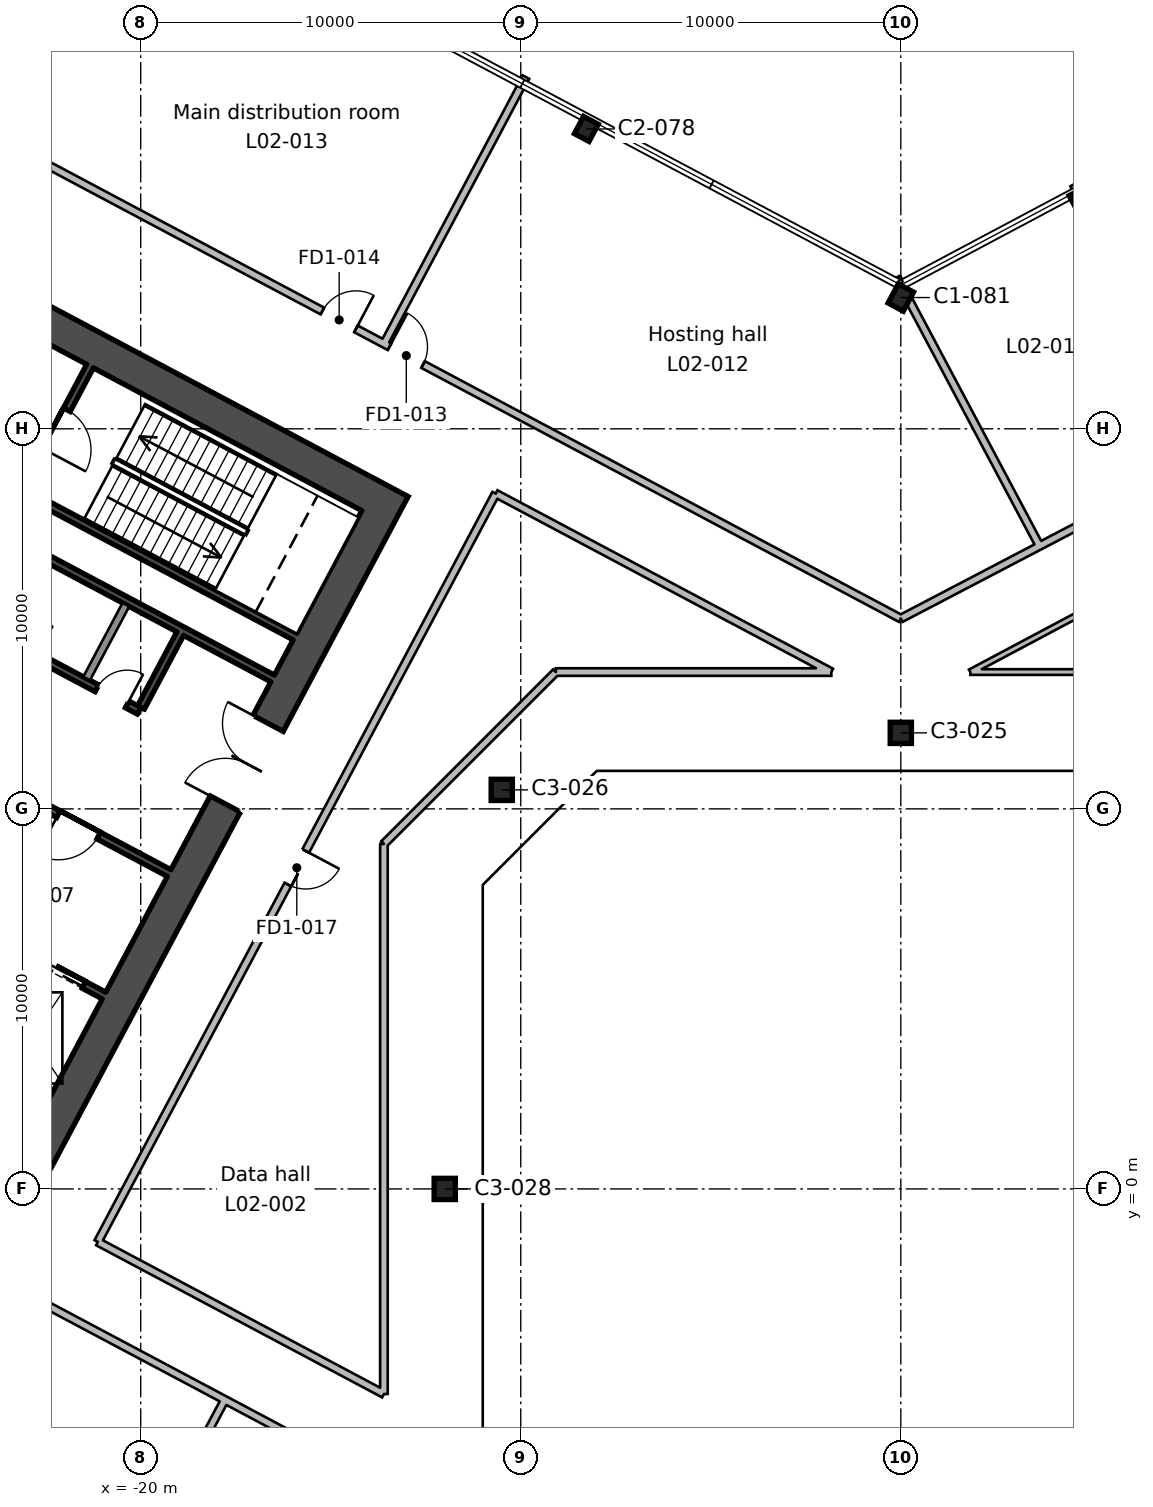
"""IFC4 building model, lengths in metres.
Left out: names, types, materials, properties, quantities, classifications, styles, units other than length and angle.
Written with IfcOpenShell. Run it as: python <this file> out.ifc"""

import sys

from ifc_helpers import new_model, si_unit, direction, frame, frame_2d, origin, origin_2d, place, context, subcontext, project, spatial, rectangle, hollow_rectangle, i_section, extrude, element, fill, save


model = new_model("IFC4")
c1 = context("Model", 3, precision=1e-05, world=origin(), true_north=direction((0.0, 1.0)))
c2 = subcontext(c1, "Body", "Model", "MODEL_VIEW")
j1 = project(units=[si_unit("LENGTHUNIT", "METRE"), si_unit("PLANEANGLEUNIT", "RADIAN")], contexts=[c1])
p1 = place(None, origin())
s1 = spatial("IfcSite", under=j1, at=p1, CompositionType="ELEMENT")
p2 = place(p1, origin())
s2 = spatial("IfcBuilding", under=s1, at=p2, CompositionType="ELEMENT")
p3 = place(p2, frame((0.0, 0.0, 12.2)))
s3 = spatial("IfcBuildingStorey", under=s2, at=p3, CompositionType="ELEMENT", Elevation=12.2)
for number, where, z_axis, x_axis in (
    (1, (-12.0, 0.0, 0.0), (0.0, 0.0, 1.0), (1.0, 0.0, 0.0)),
    (2, (-10.5, 10.5, 0.0), (0.0, 0.0, 1.0), (1.0, 0.0, 0.0)),
    (3, (0.0, 12.0, 0.0), (0.0, 0.0, 1.0), (1.0, 0.0, 0.0)),
):
    element("IfcColumn", number, at=place(p3, frame(where, z_axis=z_axis, x_axis=x_axis)), inside=s3, PredefinedType="COLUMN", context=c2, shape_type="SweptSolid", body=[
        extrude(hollow_rectangle(XDim=0.559, YDim=0.559, WallThickness=0.024, InnerFilletRadius=0.012, OuterFilletRadius=0.035, at=origin_2d()), origin(), (0.0, 0.0, 1.0), 5.4),
    ])
p4 = place(p3, frame((0.0, 23.454, 0.0), z_axis=(0.0, 0.0, 1.0), x_axis=(-0.882947592859, 0.469471562786, 0.0)))
e4 = element("IfcColumn", 4, at=p4, inside=s3, PredefinedType="COLUMN", context=c2, shape_type="SweptSolid", body=[
    extrude(i_section(OverallWidth=0.455, OverallDepth=0.569, WebThickness=0.078, FlangeThickness=0.125, FilletRadius=0.015, at=origin_2d()), origin(), (0.0, 0.0, 1.0), 5.4),
])
for number, where, z_axis, x_axis in (
    (5, (4.744, 26.012, 0.0), (0.0, 0.0, 1.0), (-0.883, -0.469, 0.0)),
    (6, (-8.275, 27.89, 0.0), (0.0, 0.0, 1.0), (-0.883, 0.469, 0.0)),
):
    element("IfcColumn", number, at=place(p3, frame(where, z_axis=z_axis, x_axis=x_axis)), inside=s3, PredefinedType="COLUMN", context=c2, shape_type="SweptSolid", body=[
        extrude(i_section(OverallWidth=0.437, OverallDepth=0.513, WebThickness=0.061, FlangeThickness=0.097, FilletRadius=0.015, at=origin_2d()), origin(), (0.0, 0.0, 1.0), 5.4),
    ])
p5 = place(p3, frame((-13.362, 18.43, 0.0), z_axis=(0.0, 0.0, 1.0), x_axis=(-0.46947084998, -0.882947971864, 0.0)))
e7 = element("IfcWall", 7, at=p5, inside=s3, PredefinedType="SHEAR", context=c2, shape_type="SweptSolid", body=[
    extrude(rectangle(XDim=20.0, YDim=0.9, at=frame_2d((10.0, 0.0))), origin(), (0.0, 0.0, 1.0), 5.4),
])
p6 = place(p5, frame((7.0, 0.0, 0.0)))
e8 = element("IfcOpeningElement", 8, at=p6, cuts=e7, PredefinedType="OPENING", context=c2, shape_type="SweptSolid", body=[
    extrude(rectangle(XDim=2.4, YDim=2.4, at=frame_2d((1.2, 1.2))), frame((0.0, 0.46, 0.0), z_axis=(0.0, -1.0, 0.0), x_axis=(1.0, 0.0, 0.0)), (0.0, 0.0, 1.0), 0.92),
])
p7 = place(p3, frame((-13.97, 18.244, 0.0), z_axis=(0.0, 0.0, 1.0), x_axis=(-0.88294509198, 0.469476266226, 0.0)))
e9 = element("IfcWall", 9, at=p7, inside=s3, PredefinedType="SHEAR", context=c2, shape_type="SweptSolid", body=[
    extrude(rectangle(XDim=20.2, YDim=0.9, at=frame_2d((10.1, 0.0))), origin(), (0.0, 0.0, 1.0), 5.4),
])
p8 = place(p3, frame((-18.96, 14.611, 0.0), z_axis=(0.0, 0.0, 1.0), x_axis=(-0.4694473164, -0.882960484464, 0.0)))
e10 = element("IfcWall", 10, at=p8, inside=s3, PredefinedType="SHEAR", context=c2, shape_type="SweptSolid", body=[
    extrude(rectangle(XDim=2.2, YDim=0.2, at=frame_2d((1.1, 0.0))), origin(), (0.0, 0.0, 1.0), 5.4),
])
p9 = place(p3, frame((-20.39, 15.372, 0.0), z_axis=(0.0, 0.0, 1.0), x_axis=(-0.4694473164, -0.882960484464, 0.0)))
e11 = element("IfcWall", 11, at=p9, inside=s3, PredefinedType="SOLIDWALL", context=c2, shape_type="SweptSolid", body=[
    extrude(rectangle(XDim=2.2, YDim=0.2, at=frame_2d((1.1, 0.0))), origin(), (0.0, 0.0, 1.0), 5.4),
])
p10 = place(p3, frame((-21.333, 21.649, 0.0), z_axis=(0.0, 0.0, 1.0), x_axis=(-0.469494272526, -0.882935517501, 0.0)))
e12 = element("IfcWall", 12, at=p10, inside=s3, PredefinedType="SHEAR", context=c2, shape_type="SweptSolid", body=[
    extrude(rectangle(XDim=7.3, YDim=0.2, at=frame_2d((3.65, 0.0))), origin(), (0.0, 0.0, 1.0), 5.4),
])
p11 = place(p10, frame((1.3, 0.0, 0.0)))
e13 = element("IfcOpeningElement", 13, at=p11, cuts=e12, PredefinedType="OPENING", context=c2, shape_type="SweptSolid", body=[
    extrude(rectangle(XDim=1.2, YDim=2.1, at=frame_2d((0.6, 1.05))), frame((0.0, 0.11, 0.0), z_axis=(0.0, -1.0, 0.0), x_axis=(1.0, 0.0, 0.0)), (0.0, 0.0, 1.0), 0.22),
])
p12 = place(p3, frame((-15.942, 14.536, 0.0), z_axis=(0.0, 0.0, 1.0), x_axis=(-0.882946947542, 0.469472776449, 0.0)))
e14 = element("IfcWall", 14, at=p12, inside=s3, PredefinedType="SHEAR", context=c2, shape_type="SweptSolid", body=[
    extrude(rectangle(XDim=8.0, YDim=0.2, at=frame_2d((4.0, 0.0))), origin(), (0.0, 0.0, 1.0), 5.4),
])
p13 = place(p3, frame((-16.529, 13.432, 0.0), z_axis=(0.0, 0.0, 1.0), x_axis=(-0.88295287151, 0.469461634952, 0.0)))
e15 = element("IfcWall", 15, at=p13, inside=s3, PredefinedType="SHEAR", context=c2, shape_type="SweptSolid", body=[
    extrude(rectangle(XDim=8.0, YDim=0.2, at=frame_2d((4.0, 0.0))), origin(), (0.0, 0.0, 1.0), 5.4),
])
p14 = place(p3, frame((-20.04, 12.581, 0.0), z_axis=(0.0, 0.0, 1.0), x_axis=(-0.882942972946, 0.469480251476, 0.0)))
e16 = element("IfcWall", 16, at=p14, inside=s3, PredefinedType="SHEAR", context=c2, shape_type="SweptSolid", body=[
    extrude(rectangle(XDim=5.4, YDim=0.2, at=frame_2d((2.7, 0.0))), origin(), (0.0, 0.0, 1.0), 5.4),
])
p15 = place(p14, frame((0.36, 0.0, 0.0)))
e17 = element("IfcOpeningElement", 17, at=p15, cuts=e16, PredefinedType="OPENING", context=c2, shape_type="SweptSolid", body=[
    extrude(rectangle(XDim=0.9, YDim=2.1, at=frame_2d((0.45, 1.05))), frame((0.0, 0.11, 0.0), z_axis=(0.0, -1.0, 0.0), x_axis=(1.0, 0.0, 0.0)), (0.0, 0.0, 1.0), 0.22),
])
p16 = place(p14, frame((3.06, 0.0, 0.0)))
e18 = element("IfcOpeningElement", 18, at=p16, cuts=e16, PredefinedType="OPENING", context=c2, shape_type="SweptSolid", body=[
    extrude(rectangle(XDim=0.9, YDim=2.1, at=frame_2d((0.45, 1.05))), frame((0.0, 0.11, 0.0), z_axis=(0.0, -1.0, 0.0), x_axis=(1.0, 0.0, 0.0)), (0.0, 0.0, 1.0), 0.22),
])
p17 = place(p3, frame((-19.252, 8.311, 0.0), z_axis=(0.0, 0.0, 1.0), x_axis=(-0.882955722218, 0.469456273365, 0.0)))
e19 = element("IfcWall", 19, at=p17, inside=s3, PredefinedType="SHEAR", context=c2, shape_type="SweptSolid", body=[
    extrude(rectangle(XDim=10.0, YDim=0.2, at=frame_2d((5.0, 0.0))), origin(), (0.0, 0.0, 1.0), 5.4),
])
p18 = place(p17, frame((2.1, 0.0, 0.0)))
e20 = element("IfcOpeningElement", 20, at=p18, cuts=e19, PredefinedType="OPENING", context=c2, shape_type="SweptSolid", body=[
    extrude(rectangle(XDim=1.2, YDim=2.1, at=frame_2d((0.6, 1.05))), frame((0.0, 0.11, 0.0), z_axis=(0.0, -1.0, 0.0), x_axis=(1.0, 0.0, 0.0)), (0.0, 0.0, 1.0), 0.22),
])
p19 = place(p3, frame((-20.965, 5.088, 0.0), z_axis=(0.0, 0.0, 1.0), x_axis=(-0.882925986334, 0.469512196493, 0.0)))
e21 = element("IfcWall", 21, at=p19, inside=s3, PredefinedType="SHEAR", context=c2, shape_type="SweptSolid", body=[
    extrude(rectangle(XDim=4.5, YDim=0.2, at=frame_2d((2.25, 0.0))), origin(), (0.0, 0.0, 1.0), 5.4),
])
p20 = place(p19, frame((0.6, 0.0, 0.0)))
e22 = element("IfcOpeningElement", 22, at=p20, cuts=e21, PredefinedType="OPENING", context=c2, shape_type="SweptSolid", body=[
    extrude(rectangle(XDim=1.1, YDim=2.1, at=frame_2d((0.55, 1.05))), frame((0.0, 0.11, 0.0), z_axis=(0.0, -1.0, 0.0), x_axis=(1.0, 0.0, 0.0)), (0.0, 0.0, 1.0), 0.22),
])
p21 = place(p3, frame((-13.6, -7.775, 0.0), z_axis=(0.0, 0.0, 1.0), x_axis=(-0.882943264249, 0.469479703626, 0.0)))
e23 = element("IfcWall", 23, at=p21, inside=s3, PredefinedType="PARTITIONING", context=c2, shape_type="SweptSolid", body=[
    extrude(rectangle(XDim=34.636, YDim=0.2, at=frame_2d((17.318, 0.0))), origin(), (0.0, 0.0, 1.0), 4.95),
])
p22 = place(p21, frame((16.85, 0.0, 0.0)))
e24 = element("IfcOpeningElement", 24, at=p22, cuts=e23, PredefinedType="OPENING", context=c2, shape_type="SweptSolid", body=[
    extrude(rectangle(XDim=1.0, YDim=2.1, at=frame_2d((0.5, 1.05))), frame((0.0, 0.11, 0.0), z_axis=(0.0, -1.0, 0.0), x_axis=(1.0, 0.0, 0.0)), (0.0, 0.0, 1.0), 0.22),
])
p23 = place(p21, frame((14.25, 0.0, 0.0)))
e25 = element("IfcOpeningElement", 25, at=p23, cuts=e23, PredefinedType="OPENING", context=c2, shape_type="SweptSolid", body=[
    extrude(rectangle(XDim=1.0, YDim=2.1, at=frame_2d((0.5, 1.05))), frame((0.0, 0.11, 0.0), z_axis=(0.0, -1.0, 0.0), x_axis=(1.0, 0.0, 0.0)), (0.0, 0.0, 1.0), 0.22),
])
p24 = place(p3, frame((-17.787, -5.549, 0.0), z_axis=(0.0, 0.0, 1.0), x_axis=(-0.469551855795, -0.882904895625, 0.0)))
e26 = element("IfcWall", 26, at=p24, inside=s3, PredefinedType="PARTITIONING", context=c2, shape_type="SweptSolid", body=[
    extrude(rectangle(XDim=7.95, YDim=0.2, at=frame_2d((3.975, 0.0))), origin(), (0.0, 0.0, 1.0), 4.95),
])
p25 = place(p3, frame((-29.479, 30.681, 0.0), z_axis=(0.0, 0.0, 1.0), x_axis=(0.882953009593, -0.469461375249, 0.0)))
e27 = element("IfcWall", 27, at=p25, inside=s3, PredefinedType="PARTITIONING", context=c2, shape_type="SweptSolid", body=[
    extrude(rectangle(XDim=33.387, YDim=0.2, at=frame_2d((16.693, 0.0))), origin(), (0.0, 0.0, 1.0), 4.95),
])
p26 = place(p25, frame((18.15, 0.0, 0.0)))
e28 = element("IfcOpeningElement", 28, at=p26, cuts=e27, PredefinedType="OPENING", context=c2, shape_type="SweptSolid", body=[
    extrude(rectangle(XDim=1.0, YDim=2.1, at=frame_2d((0.5, 1.05))), frame((0.0, 0.11, 0.0), z_axis=(0.0, -1.0, 0.0), x_axis=(1.0, 0.0, 0.0)), (0.0, 0.0, 1.0), 0.22),
])
p27 = place(p25, frame((16.15, 0.0, 0.0)))
e29 = element("IfcOpeningElement", 29, at=p27, cuts=e27, PredefinedType="OPENING", context=c2, shape_type="SweptSolid", body=[
    extrude(rectangle(XDim=1.0, YDim=2.1, at=frame_2d((0.5, 1.05))), frame((0.0, 0.11, 0.0), z_axis=(0.0, -1.0, 0.0), x_axis=(1.0, 0.0, 0.0)), (0.0, 0.0, 1.0), 0.22),
])
p28 = place(p3, frame((0.0, 15.007, 0.0), z_axis=(0.0, 0.0, 1.0), x_axis=(0.886151087154, 0.463396429352, 0.0)))
e30 = element("IfcWall", 30, at=p28, inside=s3, PredefinedType="PARTITIONING", context=c2, shape_type="SweptSolid", body=[
    extrude(rectangle(XDim=57.206, YDim=0.2, at=frame_2d((28.603, 0.0))), origin(), (0.0, 0.0, 1.0), 4.95),
])
p29 = place(p28, frame((35.149, 0.0, 0.0)))
e31 = element("IfcOpeningElement", 31, at=p29, cuts=e30, PredefinedType="OPENING", context=c2, shape_type="SweptSolid", body=[
    extrude(rectangle(XDim=1.0, YDim=2.1, at=frame_2d((0.5, 1.05))), frame((0.0, 0.11, 0.0), z_axis=(0.0, -1.0, 0.0), x_axis=(1.0, 0.0, 0.0)), (0.0, 0.0, 1.0), 0.22),
])
p30 = place(p28, frame((28.15, 0.0, 0.0)))
e32 = element("IfcOpeningElement", 32, at=p30, cuts=e30, PredefinedType="OPENING", context=c2, shape_type="SweptSolid", body=[
    extrude(rectangle(XDim=1.0, YDim=2.1, at=frame_2d((0.5, 1.05))), frame((0.0, 0.11, 0.0), z_axis=(0.0, -1.0, 0.0), x_axis=(1.0, 0.0, 0.0)), (0.0, 0.0, 1.0), 0.22),
])
p31 = place(p28, frame((23.949, 0.0, 0.0)))
e33 = element("IfcOpeningElement", 33, at=p31, cuts=e30, PredefinedType="OPENING", context=c2, shape_type="SweptSolid", body=[
    extrude(rectangle(XDim=1.0, YDim=2.1, at=frame_2d((0.5, 1.05))), frame((0.0, 0.11, 0.0), z_axis=(0.0, -1.0, 0.0), x_axis=(1.0, 0.0, 0.0)), (0.0, 0.0, 1.0), 0.22),
])
p32 = place(p28, frame((8.25, 0.0, 0.0)))
e34 = element("IfcOpeningElement", 34, at=p32, cuts=e30, PredefinedType="OPENING", context=c2, shape_type="SweptSolid", body=[
    extrude(rectangle(XDim=0.95, YDim=2.1, at=frame_2d((0.475, 1.05))), frame((0.0, 0.11, 0.0), z_axis=(0.0, -1.0, 0.0), x_axis=(1.0, 0.0, 0.0)), (0.0, 0.0, 1.0), 0.22),
])
p33 = place(p3, frame((-9.864, 29.255, 0.0), z_axis=(0.0, 0.0, 1.0), x_axis=(-0.469468822461, -0.88294904991, 0.0)))
e35 = element("IfcWall", 35, at=p33, inside=s3, PredefinedType="PARTITIONING", context=c2, shape_type="SweptSolid", body=[
    extrude(rectangle(XDim=7.949, YDim=0.2, at=frame_2d((3.975, 0.0))), origin(), (0.0, 0.0, 1.0), 4.95),
])
p34 = place(p3, frame((-0.105, 23.984, 0.0), z_axis=(0.0, 0.0, 1.0), x_axis=(0.469381988783, -0.882995214373, 0.0)))
e36 = element("IfcWall", 36, at=p34, inside=s3, PredefinedType="PARTITIONING", context=c2, shape_type="SweptSolid", body=[
    extrude(rectangle(XDim=7.976, YDim=0.2, at=frame_2d((3.988, 0.0))), origin(), (0.0, 0.0, 1.0), 4.95),
])
p35 = place(p3, frame((4.549, 26.429, 0.0), z_axis=(0.0, 0.0, 1.0), x_axis=(0.469456091969, -0.882955818664, 0.0)))
e37 = element("IfcWall", 37, at=p35, inside=s3, PredefinedType="PARTITIONING", context=c2, shape_type="SweptSolid", body=[
    extrude(rectangle(XDim=7.949, YDim=0.2, at=frame_2d((3.975, 0.0))), origin(), (0.0, 0.0, 1.0), 4.95),
])
p36 = place(p3, frame((-21.128, -1.394, 0.0), z_axis=(0.0, 0.0, 1.0), x_axis=(0.46951219964, 0.882925984661, 0.0)))
e38 = element("IfcWall", 38, at=p36, inside=s3, PredefinedType="PARTITIONING", context=c2, shape_type="SweptSolid", body=[
    extrude(rectangle(XDim=22.3, YDim=0.2, at=frame_2d((11.15, 0.0))), origin(), (0.0, 0.0, 1.0), 4.95),
])
p37 = place(p36, frame((10.65, 0.0, 0.0)))
e39 = element("IfcOpeningElement", 39, at=p37, cuts=e38, PredefinedType="OPENING", context=c2, shape_type="SweptSolid", body=[
    extrude(rectangle(XDim=1.0, YDim=2.1, at=frame_2d((0.5, 1.05))), frame((0.0, 0.11, 0.0), z_axis=(0.0, -1.0, 0.0), x_axis=(1.0, 0.0, 0.0)), (0.0, 0.0, 1.0), 0.22),
])
p38 = place(p3, frame((-10.658, 18.295, 0.0), z_axis=(0.0, 0.0, 1.0), x_axis=(0.88295636352, -0.4694550672, 0.0)))
e40 = element("IfcWall", 40, at=p38, inside=s3, PredefinedType="PARTITIONING", context=c2, shape_type="SweptSolid", body=[
    extrude(rectangle(XDim=10.0, YDim=0.2, at=frame_2d((5.0, 0.0))), origin(), (0.0, 0.0, 1.0), 4.95),
])
p39 = place(p3, frame((-1.828, 13.6, 0.0), z_axis=(0.0, 0.0, 1.0), x_axis=(-1.0, 0.0, 0.0)))
e41 = element("IfcWall", 41, at=p39, inside=s3, PredefinedType="PARTITIONING", context=c2, shape_type="SweptSolid", body=[
    extrude(rectangle(XDim=7.249, YDim=0.2, at=frame_2d((3.625, 0.0))), origin(), (0.0, 0.0, 1.0), 4.95),
])
p40 = place(p3, frame((-9.077, 13.6, 0.0), z_axis=(0.0, 0.0, 1.0), x_axis=(-0.707106781187, -0.707106781187, 0.0)))
e42 = element("IfcWall", 42, at=p40, inside=s3, PredefinedType="PARTITIONING", context=c2, shape_type="SweptSolid", body=[
    extrude(rectangle(XDim=6.397, YDim=0.2, at=frame_2d((3.198, 0.0))), origin(), (0.0, 0.0, 1.0), 4.95),
])
p41 = place(p3, frame((-13.6, 9.077, 0.0), z_axis=(0.0, 0.0, 1.0), x_axis=(0.0, -1.0, 0.0)))
e43 = element("IfcWall", 43, at=p41, inside=s3, PredefinedType="PARTITIONING", context=c2, shape_type="SweptSolid", body=[
    extrude(rectangle(XDim=14.474, YDim=0.2, at=frame_2d((7.237, 0.0))), origin(), (0.0, 0.0, 1.0), 4.95),
])
p42 = place(p3, frame((-13.6, -5.397, 0.0), z_axis=(0.0, 0.0, 1.0), x_axis=(-0.882932501381, 0.469499944627, 0.0)))
e44 = element("IfcWall", 44, at=p42, inside=s3, PredefinedType="PARTITIONING", context=c2, shape_type="SweptSolid", body=[
    extrude(rectangle(XDim=8.526, YDim=0.2, at=frame_2d((4.263, 0.0))), origin(), (0.0, 0.0, 1.0), 4.95),
])
p43 = place(p3, frame((1.828, 13.6, 0.0), z_axis=(0.0, 0.0, 1.0), x_axis=(1.0, 0.0, 0.0)))
e45 = element("IfcWall", 45, at=p43, inside=s3, PredefinedType="PARTITIONING", context=c2, shape_type="SweptSolid", body=[
    extrude(rectangle(XDim=6.797, YDim=0.15, at=frame_2d((3.398, 0.0))), origin(), (0.0, 0.0, 1.0), 4.95),
])
p44 = place(p3, frame((7.127, 16.417, 0.0), z_axis=(0.0, 0.0, 1.0), x_axis=(-0.882994016778, -0.469384241676, 0.0)))
e46 = element("IfcWall", 46, at=p44, inside=s3, PredefinedType="PARTITIONING", context=c2, shape_type="SweptSolid", body=[
    extrude(rectangle(XDim=6.001, YDim=0.15, at=frame_2d((3.0, 0.0))), origin(), (0.0, 0.0, 1.0), 4.95),
])
p45 = place(p6, frame((2.4, 0.0, 0.0), z_axis=(0.0, 0.0, 1.0), x_axis=(-1.0, 0.0, 0.0)))
e47 = element("IfcDoor", 47, at=p45, inside=s3, OperationType="DOUBLE_DOOR_SINGLE_SWING", PredefinedType="DOOR", context=c2, shape_type="SweptSolid", body=[
    extrude(rectangle(XDim=2.4, YDim=2.4, at=frame_2d((1.2, 1.2))), frame((0.0, 0.025, 0.0), z_axis=(0.0, -1.0, 0.0), x_axis=(1.0, 0.0, 0.0)), (0.0, 0.0, 1.0), 0.05),
])
fill(e8, e47)
p46 = place(p18, origin())
e48 = element("IfcDoor", 48, at=p46, inside=s3, OperationType="SINGLE_SWING_RIGHT", PredefinedType="DOOR", context=c2, shape_type="SweptSolid", body=[
    extrude(rectangle(XDim=1.2, YDim=2.1, at=frame_2d((0.6, 1.05))), frame((0.0, 0.025, 0.0), z_axis=(0.0, -1.0, 0.0), x_axis=(1.0, 0.0, 0.0)), (0.0, 0.0, 1.0), 0.05),
])
fill(e20, e48)
p47 = place(p11, origin())
e49 = element("IfcDoor", 49, at=p47, inside=s3, OperationType="SINGLE_SWING_RIGHT", PredefinedType="DOOR", context=c2, shape_type="SweptSolid", body=[
    extrude(rectangle(XDim=1.2, YDim=2.1, at=frame_2d((0.6, 1.05))), frame((0.0, 0.025, 0.0), z_axis=(0.0, -1.0, 0.0), x_axis=(1.0, 0.0, 0.0)), (0.0, 0.0, 1.0), 0.05),
])
fill(e13, e49)
p48 = place(p15, frame((0.9, 0.0, 0.0), z_axis=(0.0, 0.0, 1.0), x_axis=(-1.0, 0.0, 0.0)))
e50 = element("IfcDoor", 50, at=p48, inside=s3, OperationType="SINGLE_SWING_RIGHT", PredefinedType="DOOR", context=c2, shape_type="SweptSolid", body=[
    extrude(rectangle(XDim=0.9, YDim=2.1, at=frame_2d((0.45, 1.05))), frame((0.0, 0.025, 0.0), z_axis=(0.0, -1.0, 0.0), x_axis=(1.0, 0.0, 0.0)), (0.0, 0.0, 1.0), 0.05),
])
fill(e17, e50)
p49 = place(p20, origin())
e51 = element("IfcDoor", 51, at=p49, inside=s3, OperationType="DOUBLE_DOOR_SLIDING", PredefinedType="DOOR", context=c2, shape_type="SweptSolid", body=[
    extrude(rectangle(XDim=1.1, YDim=2.1, at=frame_2d((0.55, 1.05))), frame((0.0, 0.025, 0.0), z_axis=(0.0, -1.0, 0.0), x_axis=(1.0, 0.0, 0.0)), (0.0, 0.0, 1.0), 0.05),
])
fill(e22, e51)
p50 = place(p37, frame((1.0, 0.0, 0.0), z_axis=(0.0, 0.0, 1.0), x_axis=(-1.0, 0.0, 0.0)))
e52 = element("IfcDoor", 52, at=p50, inside=s3, OperationType="SINGLE_SWING_LEFT", PredefinedType="DOOR", context=c2, shape_type="SweptSolid", body=[
    extrude(rectangle(XDim=1.0, YDim=2.1, at=frame_2d((0.5, 1.05))), frame((0.0, 0.025, 0.0), z_axis=(0.0, -1.0, 0.0), x_axis=(1.0, 0.0, 0.0)), (0.0, 0.0, 1.0), 0.05),
])
fill(e39, e52)
p51 = place(p26, origin())
e53 = element("IfcDoor", 53, at=p51, inside=s3, OperationType="SINGLE_SWING_LEFT", PredefinedType="DOOR", context=c2, shape_type="SweptSolid", body=[
    extrude(rectangle(XDim=1.0, YDim=2.1, at=frame_2d((0.5, 1.05))), frame((0.0, 0.025, 0.0), z_axis=(0.0, -1.0, 0.0), x_axis=(1.0, 0.0, 0.0)), (0.0, 0.0, 1.0), 0.05),
])
fill(e28, e53)
p52 = place(p27, origin())
e54 = element("IfcDoor", 54, at=p52, inside=s3, OperationType="SINGLE_SWING_RIGHT", PredefinedType="DOOR", context=c2, shape_type="SweptSolid", body=[
    extrude(rectangle(XDim=1.0, YDim=2.1, at=frame_2d((0.5, 1.05))), frame((0.0, 0.025, 0.0), z_axis=(0.0, -1.0, 0.0), x_axis=(1.0, 0.0, 0.0)), (0.0, 0.0, 1.0), 0.05),
])
fill(e29, e54)
save(model, sys.argv[1])
